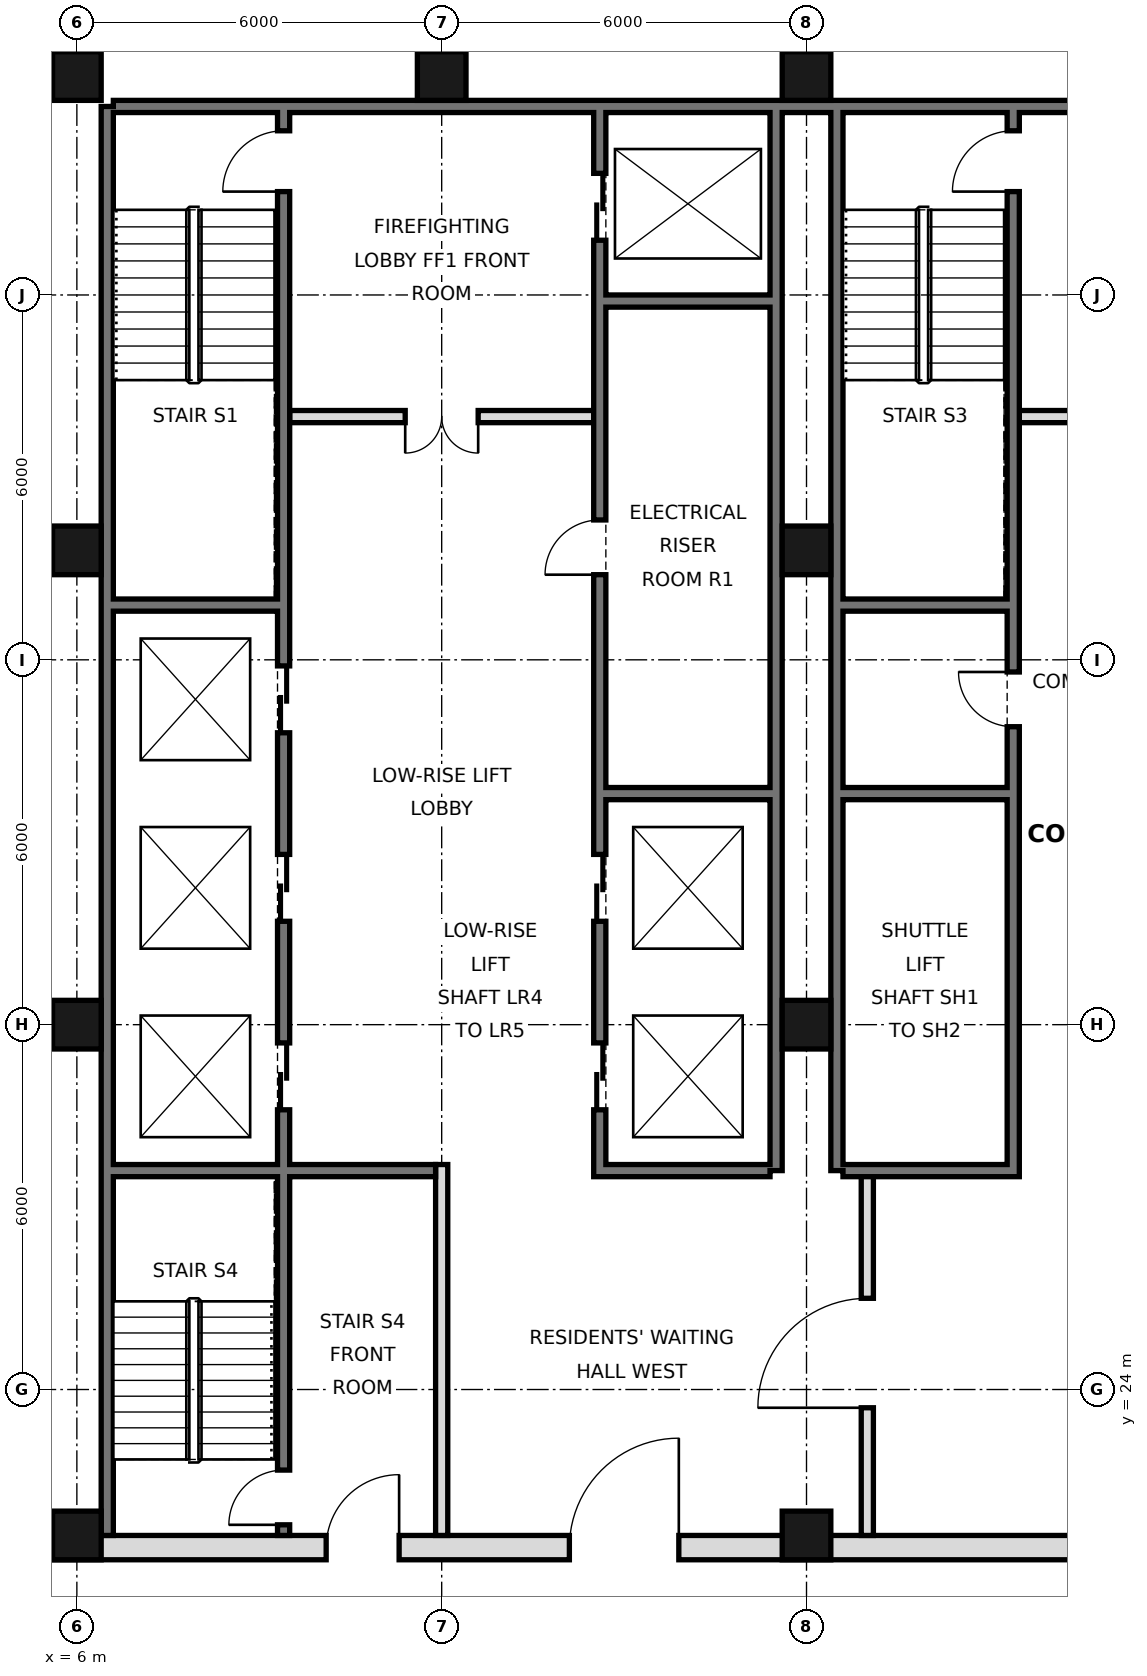
"""IFC4 building model, lengths in metres.
Left out: names, types, materials, properties, quantities, classifications, styles, units other than length and angle.
Written with IfcOpenShell. Run it as: python <this file> out.ifc"""

import sys

from ifc_helpers import new_model, si_unit, direction, frame, frame_2d, origin, origin_2d, place, context, subcontext, project, spatial, rectangle, hollow_rectangle, extrude, element, fill, save


model = new_model("IFC4")
c1 = context("Model", 3, precision=1e-05, world=origin(), true_north=direction((0.0, 1.0)))
c2 = subcontext(c1, "Body", "Model", "MODEL_VIEW")
j1 = project(units=[si_unit("LENGTHUNIT", "METRE"), si_unit("PLANEANGLEUNIT", "RADIAN")], contexts=[c1])
p1 = place(None, origin())
s1 = spatial("IfcSite", under=j1, at=p1, CompositionType="ELEMENT")
p2 = place(p1, origin())
s2 = spatial("IfcBuilding", under=s1, at=p2, CompositionType="ELEMENT")
p3 = place(p2, frame((0.0, 0.0, 103.4)))
s3 = spatial("IfcBuildingStorey", under=s2, at=p3, CompositionType="ELEMENT", Elevation=103.4)
for number, where, z_axis, x_axis in (
    (1, (6.0, 21.6, 0.0), (0.0, 0.0, 1.0), (1.0, 0.0, 0.0)),
    (2, (6.0, 30.0, 0.0), (0.0, 0.0, 1.0), (1.0, 0.0, 0.0)),
    (3, (6.0, 37.8, 0.0), (0.0, 0.0, 1.0), (1.0, 0.0, 0.0)),
    (4, (6.0, 45.6, 0.0), (0.0, 0.0, 1.0), (1.0, 0.0, 0.0)),
    (5, (12.0, 45.6, 0.0), (0.0, 0.0, 1.0), (1.0, 0.0, 0.0)),
    (6, (18.0, 21.6, 0.0), (0.0, 0.0, 1.0), (1.0, 0.0, 0.0)),
    (7, (18.0, 30.0, 0.0), (0.0, 0.0, 1.0), (1.0, 0.0, 0.0)),
    (8, (18.0, 37.8, 0.0), (0.0, 0.0, 1.0), (1.0, 0.0, 0.0)),
    (9, (18.0, 45.6, 0.0), (0.0, 0.0, 1.0), (1.0, 0.0, 0.0)),
):
    element("IfcColumn", number, at=place(p3, frame(where, z_axis=z_axis, x_axis=x_axis)), inside=s3, PredefinedType="COLUMN", context=c2, shape_type="SweptSolid", body=[
        extrude(hollow_rectangle(XDim=0.8, YDim=0.8, WallThickness=0.05, at=origin_2d()), origin(), (0.0, 0.0, 1.0), 3.6),
    ])
p4 = place(p3, frame((6.5, 21.6, 0.0), z_axis=(0.0, 0.0, 1.0), x_axis=(0.0, 1.0, 0.0)))
e10 = element("IfcWall", 10, at=p4, inside=s3, PredefinedType="SOLIDWALL", context=c2, shape_type="SweptSolid", body=[
    extrude(rectangle(XDim=23.5, YDim=0.2, at=frame_2d((11.75, 0.0))), origin(), (0.0, 0.0, 1.0), 3.42),
])
p5 = place(p3, frame((6.6, 45.1, 0.0), z_axis=(0.0, 0.0, 1.0), x_axis=(1.0, 0.0, 0.0)))
e11 = element("IfcWall", 11, at=p5, inside=s3, PredefinedType="SOLIDWALL", context=c2, shape_type="SweptSolid", body=[
    extrude(rectangle(XDim=34.8, YDim=0.2, at=frame_2d((17.4, 0.0))), origin(), (0.0, 0.0, 1.0), 3.42),
])
for number, where, z_axis, x_axis in (
    (12, (17.5, 27.6, 0.0), (0.0, 0.0, 1.0), (0.0, 1.0, 0.0)),
    (13, (18.5, 27.6, 0.0), (0.0, 0.0, 1.0), (0.0, 1.0, 0.0)),
):
    element("IfcWall", number, at=place(p3, frame(where, z_axis=z_axis, x_axis=x_axis)), inside=s3, PredefinedType="SOLIDWALL", context=c2, shape_type="SweptSolid", body=[
        extrude(rectangle(XDim=17.5, YDim=0.2, at=frame_2d((8.75, 0.0))), origin(), (0.0, 0.0, 1.0), 3.42),
    ])
p6 = place(p3, frame((5.6, 21.4, 0.0), z_axis=(0.0, 0.0, 1.0), x_axis=(1.0, 0.0, 0.0)))
e14 = element("IfcWall", 14, at=p6, inside=s3, PredefinedType="SOLIDWALL", context=c2, shape_type="SweptSolid", body=[
    extrude(rectangle(XDim=36.8, YDim=0.4, at=frame_2d((18.4, 0.0))), origin(), (0.0, 0.0, 1.0), 3.42),
])
p7 = place(p6, frame((8.5, 0.0, 0.0)))
e15 = element("IfcOpeningElement", 15, at=p7, cuts=e14, PredefinedType="OPENING", context=c2, shape_type="SweptSolid", body=[
    extrude(rectangle(XDim=1.8, YDim=2.1, at=frame_2d((0.9, 1.05))), frame((0.0, 0.21, 0.0), z_axis=(0.0, -1.0, 0.0), x_axis=(1.0, 0.0, 0.0)), (0.0, 0.0, 1.0), 0.42),
])
p8 = place(p6, frame((17.5, 0.0, 0.0)))
e16 = element("IfcOpeningElement", 16, at=p8, cuts=e14, PredefinedType="OPENING", context=c2, shape_type="SweptSolid", body=[
    extrude(rectangle(XDim=1.8, YDim=2.1, at=frame_2d((0.9, 1.05))), frame((0.0, 0.21, 0.0), z_axis=(0.0, -1.0, 0.0), x_axis=(1.0, 0.0, 0.0)), (0.0, 0.0, 1.0), 0.42),
])
p9 = place(p6, frame((26.5, 0.0, 0.0)))
e17 = element("IfcOpeningElement", 17, at=p9, cuts=e14, PredefinedType="OPENING", context=c2, shape_type="SweptSolid", body=[
    extrude(rectangle(XDim=1.8, YDim=2.1, at=frame_2d((0.9, 1.05))), frame((0.0, 0.21, 0.0), z_axis=(0.0, -1.0, 0.0), x_axis=(1.0, 0.0, 0.0)), (0.0, 0.0, 1.0), 0.42),
])
p10 = place(p6, frame((4.5, 0.0, 0.0)))
e18 = element("IfcOpeningElement", 18, at=p10, cuts=e14, PredefinedType="OPENING", context=c2, shape_type="SweptSolid", body=[
    extrude(rectangle(XDim=1.2, YDim=2.1, at=frame_2d((0.6, 1.05))), frame((0.0, 0.21, 0.0), z_axis=(0.0, -1.0, 0.0), x_axis=(1.0, 0.0, 0.0)), (0.0, 0.0, 1.0), 0.42),
])
p11 = place(p6, frame((31.1, 0.0, 0.0)))
e19 = element("IfcOpeningElement", 19, at=p11, cuts=e14, PredefinedType="OPENING", context=c2, shape_type="SweptSolid", body=[
    extrude(rectangle(XDim=1.2, YDim=2.1, at=frame_2d((0.6, 1.05))), frame((0.0, 0.21, 0.0), z_axis=(0.0, -1.0, 0.0), x_axis=(1.0, 0.0, 0.0)), (0.0, 0.0, 1.0), 0.42),
])
p12 = place(p3, frame((19.0, 21.6, 0.0), z_axis=(0.0, 0.0, 1.0), x_axis=(0.0, 1.0, 0.0)))
e20 = element("IfcWall", 20, at=p12, inside=s3, PredefinedType="PARTITIONING", context=c2, shape_type="SweptSolid", body=[
    extrude(rectangle(XDim=6.0, YDim=0.2, at=frame_2d((3.0, 0.0))), origin(), (0.0, 0.0, 1.0), 3.42),
])
p13 = place(p12, frame((2.1, 0.0, 0.0)))
e21 = element("IfcOpeningElement", 21, at=p13, cuts=e20, PredefinedType="OPENING", context=c2, shape_type="SweptSolid", body=[
    extrude(rectangle(XDim=1.8, YDim=2.1, at=frame_2d((0.9, 1.05))), frame((0.0, 0.11, 0.0), z_axis=(0.0, -1.0, 0.0), x_axis=(1.0, 0.0, 0.0)), (0.0, 0.0, 1.0), 0.22),
])
p14 = place(p3, frame((12.0, 21.6, 0.0), z_axis=(0.0, 0.0, 1.0), x_axis=(0.0, 1.0, 0.0)))
e22 = element("IfcWall", 22, at=p14, inside=s3, PredefinedType="PARTITIONING", context=c2, shape_type="SweptSolid", body=[
    extrude(rectangle(XDim=6.1, YDim=0.2, at=frame_2d((3.05, 0.0))), origin(), (0.0, 0.0, 1.0), 3.42),
])
p15 = place(p3, frame((14.6, 27.5, 0.0), z_axis=(0.0, 0.0, 1.0), x_axis=(0.0, 1.0, 0.0)))
e23 = element("IfcWall", 23, at=p15, inside=s3, PredefinedType="SOLIDWALL", context=c2, shape_type="SweptSolid", body=[
    extrude(rectangle(XDim=17.5, YDim=0.2, at=frame_2d((8.75, 0.0))), origin(), (0.0, 0.0, 1.0), 3.42),
])
p16 = place(p15, frame((1.1, 0.0, 0.0)))
e24 = element("IfcOpeningElement", 24, at=p16, cuts=e23, PredefinedType="OPENING", context=c2, shape_type="SweptSolid", body=[
    extrude(rectangle(XDim=1.1, YDim=2.1, at=frame_2d((0.55, 1.05))), frame((0.0, 0.11, 0.0), z_axis=(0.0, -1.0, 0.0), x_axis=(1.0, 0.0, 0.0)), (0.0, 0.0, 1.0), 0.22),
])
p17 = place(p15, frame((4.2, 0.0, 0.0)))
e25 = element("IfcOpeningElement", 25, at=p17, cuts=e23, PredefinedType="OPENING", context=c2, shape_type="SweptSolid", body=[
    extrude(rectangle(XDim=1.1, YDim=2.1, at=frame_2d((0.55, 1.05))), frame((0.0, 0.11, 0.0), z_axis=(0.0, -1.0, 0.0), x_axis=(1.0, 0.0, 0.0)), (0.0, 0.0, 1.0), 0.22),
])
p18 = place(p15, frame((15.4, 0.0, 0.0)))
e26 = element("IfcOpeningElement", 26, at=p18, cuts=e23, PredefinedType="OPENING", context=c2, shape_type="SweptSolid", body=[
    extrude(rectangle(XDim=1.1, YDim=2.1, at=frame_2d((0.55, 1.05))), frame((0.0, 0.11, 0.0), z_axis=(0.0, -1.0, 0.0), x_axis=(1.0, 0.0, 0.0)), (0.0, 0.0, 1.0), 0.22),
])
p19 = place(p15, frame((9.9, 0.0, 0.0)))
e27 = element("IfcOpeningElement", 27, at=p19, cuts=e23, PredefinedType="OPENING", context=c2, shape_type="SweptSolid", body=[
    extrude(rectangle(XDim=0.9, YDim=2.1, at=frame_2d((0.45, 1.05))), frame((0.0, 0.11, 0.0), z_axis=(0.0, -1.0, 0.0), x_axis=(1.0, 0.0, 0.0)), (0.0, 0.0, 1.0), 0.22),
])
p20 = place(p3, frame((21.4, 27.5, 0.0), z_axis=(0.0, 0.0, 1.0), x_axis=(0.0, 1.0, 0.0)))
e28 = element("IfcWall", 28, at=p20, inside=s3, PredefinedType="SOLIDWALL", context=c2, shape_type="SweptSolid", body=[
    extrude(rectangle(XDim=17.5, YDim=0.2, at=frame_2d((8.75, 0.0))), origin(), (0.0, 0.0, 1.0), 3.42),
])
p21 = place(p20, frame((16.2, 0.0, 0.0)))
e29 = element("IfcOpeningElement", 29, at=p21, cuts=e28, PredefinedType="OPENING", context=c2, shape_type="SweptSolid", body=[
    extrude(rectangle(XDim=1.0, YDim=2.1, at=frame_2d((0.5, 1.05))), frame((0.0, 0.11, 0.0), z_axis=(0.0, -1.0, 0.0), x_axis=(1.0, 0.0, 0.0)), (0.0, 0.0, 1.0), 0.22),
])
p22 = place(p20, frame((7.4, 0.0, 0.0)))
e30 = element("IfcOpeningElement", 30, at=p22, cuts=e28, PredefinedType="OPENING", context=c2, shape_type="SweptSolid", body=[
    extrude(rectangle(XDim=0.9, YDim=2.1, at=frame_2d((0.45, 1.05))), frame((0.0, 0.11, 0.0), z_axis=(0.0, -1.0, 0.0), x_axis=(1.0, 0.0, 0.0)), (0.0, 0.0, 1.0), 0.22),
])
p23 = place(p3, frame((9.4, 21.6, 0.0), z_axis=(0.0, 0.0, 1.0), x_axis=(0.0, 1.0, 0.0)))
e31 = element("IfcWall", 31, at=p23, inside=s3, PredefinedType="SOLIDWALL", context=c2, shape_type="SweptSolid", body=[
    extrude(rectangle(XDim=23.4, YDim=0.2, at=frame_2d((11.7, 0.0))), origin(), (0.0, 0.0, 1.0), 3.42),
])
p24 = place(p23, frame((7.0, 0.0, 0.0)))
e32 = element("IfcOpeningElement", 32, at=p24, cuts=e31, PredefinedType="OPENING", context=c2, shape_type="SweptSolid", body=[
    extrude(rectangle(XDim=1.1, YDim=2.1, at=frame_2d((0.55, 1.05))), frame((0.0, 0.11, 0.0), z_axis=(0.0, -1.0, 0.0), x_axis=(1.0, 0.0, 0.0)), (0.0, 0.0, 1.0), 0.22),
])
p25 = place(p23, frame((10.1, 0.0, 0.0)))
e33 = element("IfcOpeningElement", 33, at=p25, cuts=e31, PredefinedType="OPENING", context=c2, shape_type="SweptSolid", body=[
    extrude(rectangle(XDim=1.1, YDim=2.1, at=frame_2d((0.55, 1.05))), frame((0.0, 0.11, 0.0), z_axis=(0.0, -1.0, 0.0), x_axis=(1.0, 0.0, 0.0)), (0.0, 0.0, 1.0), 0.22),
])
p26 = place(p23, frame((13.2, 0.0, 0.0)))
e34 = element("IfcOpeningElement", 34, at=p26, cuts=e31, PredefinedType="OPENING", context=c2, shape_type="SweptSolid", body=[
    extrude(rectangle(XDim=1.1, YDim=2.1, at=frame_2d((0.55, 1.05))), frame((0.0, 0.11, 0.0), z_axis=(0.0, -1.0, 0.0), x_axis=(1.0, 0.0, 0.0)), (0.0, 0.0, 1.0), 0.22),
])
p27 = place(p23, frame((22.1, 0.0, 0.0)))
e35 = element("IfcOpeningElement", 35, at=p27, cuts=e31, PredefinedType="OPENING", context=c2, shape_type="SweptSolid", body=[
    extrude(rectangle(XDim=1.0, YDim=2.1, at=frame_2d((0.5, 1.05))), frame((0.0, 0.11, 0.0), z_axis=(0.0, -1.0, 0.0), x_axis=(1.0, 0.0, 0.0)), (0.0, 0.0, 1.0), 0.22),
])
p28 = place(p23, frame((0.175, 0.0, 0.0)))
e36 = element("IfcOpeningElement", 36, at=p28, cuts=e31, PredefinedType="OPENING", context=c2, shape_type="SweptSolid", body=[
    extrude(rectangle(XDim=0.9, YDim=2.1, at=frame_2d((0.45, 1.05))), frame((0.0, 0.11, 0.0), z_axis=(0.0, -1.0, 0.0), x_axis=(1.0, 0.0, 0.0)), (0.0, 0.0, 1.0), 0.22),
])
for number, where, z_axis, x_axis in (
    (37, (14.7, 27.6, 0.0), (0.0, 0.0, 1.0), (1.0, 0.0, 0.0)),
    (38, (18.6, 27.6, 0.0), (0.0, 0.0, 1.0), (1.0, 0.0, 0.0)),
):
    element("IfcWall", number, at=place(p3, frame(where, z_axis=z_axis, x_axis=x_axis)), inside=s3, PredefinedType="SOLIDWALL", context=c2, shape_type="SweptSolid", body=[
        extrude(rectangle(XDim=2.7, YDim=0.2, at=frame_2d((1.35, 0.0))), origin(), (0.0, 0.0, 1.0), 3.42),
    ])
p29 = place(p3, frame((6.6, 27.6, 0.0), z_axis=(0.0, 0.0, 1.0), x_axis=(1.0, 0.0, 0.0)))
e39 = element("IfcWall", 39, at=p29, inside=s3, PredefinedType="SOLIDWALL", context=c2, shape_type="SweptSolid", body=[
    extrude(rectangle(XDim=5.3, YDim=0.2, at=frame_2d((2.65, 0.0))), origin(), (0.0, 0.0, 1.0), 3.42),
])
for number, where, z_axis, x_axis in (
    (40, (14.7, 33.8, 0.0), (0.0, 0.0, 1.0), (1.0, 0.0, 0.0)),
    (41, (18.6, 33.8, 0.0), (0.0, 0.0, 1.0), (1.0, 0.0, 0.0)),
    (42, (18.6, 36.9, 0.0), (0.0, 0.0, 1.0), (1.0, 0.0, 0.0)),
    (43, (6.6, 36.9, 0.0), (0.0, 0.0, 1.0), (1.0, 0.0, 0.0)),
):
    element("IfcWall", number, at=place(p3, frame(where, z_axis=z_axis, x_axis=x_axis)), inside=s3, PredefinedType="SOLIDWALL", context=c2, shape_type="SweptSolid", body=[
        extrude(rectangle(XDim=2.7, YDim=0.2, at=frame_2d((1.35, 0.0))), origin(), (0.0, 0.0, 1.0), 3.42),
    ])
p30 = place(p3, frame((21.5, 40.0, 0.0), z_axis=(0.0, 0.0, 1.0), x_axis=(1.0, 0.0, 0.0)))
e44 = element("IfcWall", 44, at=p30, inside=s3, PredefinedType="PARTITIONING", context=c2, shape_type="SweptSolid", body=[
    extrude(rectangle(XDim=5.0, YDim=0.2, at=frame_2d((2.5, 0.0))), origin(), (0.0, 0.0, 1.0), 3.42),
])
p31 = place(p30, frame((1.9, 0.0, 0.0)))
e45 = element("IfcOpeningElement", 45, at=p31, cuts=e44, PredefinedType="OPENING", context=c2, shape_type="SweptSolid", body=[
    extrude(rectangle(XDim=1.2, YDim=2.1, at=frame_2d((0.6, 1.05))), frame((0.0, 0.11, 0.0), z_axis=(0.0, -1.0, 0.0), x_axis=(1.0, 0.0, 0.0)), (0.0, 0.0, 1.0), 0.22),
])
p32 = place(p3, frame((9.5, 40.0, 0.0), z_axis=(0.0, 0.0, 1.0), x_axis=(1.0, 0.0, 0.0)))
e46 = element("IfcWall", 46, at=p32, inside=s3, PredefinedType="PARTITIONING", context=c2, shape_type="SweptSolid", body=[
    extrude(rectangle(XDim=5.0, YDim=0.2, at=frame_2d((2.5, 0.0))), origin(), (0.0, 0.0, 1.0), 3.42),
])
p33 = place(p32, frame((1.9, 0.0, 0.0)))
e47 = element("IfcOpeningElement", 47, at=p33, cuts=e46, PredefinedType="OPENING", context=c2, shape_type="SweptSolid", body=[
    extrude(rectangle(XDim=1.2, YDim=2.1, at=frame_2d((0.6, 1.05))), frame((0.0, 0.11, 0.0), z_axis=(0.0, -1.0, 0.0), x_axis=(1.0, 0.0, 0.0)), (0.0, 0.0, 1.0), 0.22),
])
p34 = place(p3, frame((14.7, 41.9, 0.0), z_axis=(0.0, 0.0, 1.0), x_axis=(1.0, 0.0, 0.0)))
e48 = element("IfcWall", 48, at=p34, inside=s3, PredefinedType="SOLIDWALL", context=c2, shape_type="SweptSolid", body=[
    extrude(rectangle(XDim=2.7, YDim=0.2, at=frame_2d((1.35, 0.0))), origin(), (0.0, 0.0, 1.0), 3.42),
])
p35 = place(p7, frame((1.8, 0.0, 0.0), z_axis=(0.0, 0.0, 1.0), x_axis=(-1.0, 0.0, 0.0)))
e49 = element("IfcDoor", 49, at=p35, inside=s3, OperationType="SINGLE_SWING_LEFT", PredefinedType="DOOR", context=c2, shape_type="SweptSolid", body=[
    extrude(rectangle(XDim=1.8, YDim=2.1, at=frame_2d((0.9, 1.05))), frame((0.0, 0.025, 0.0), z_axis=(0.0, -1.0, 0.0), x_axis=(1.0, 0.0, 0.0)), (0.0, 0.0, 1.0), 0.05),
])
fill(e15, e49)
p36 = place(p13, origin())
e50 = element("IfcDoor", 50, at=p36, inside=s3, OperationType="SINGLE_SWING_LEFT", PredefinedType="DOOR", context=c2, shape_type="SweptSolid", body=[
    extrude(rectangle(XDim=1.8, YDim=2.1, at=frame_2d((0.9, 1.05))), frame((0.0, 0.025, 0.0), z_axis=(0.0, -1.0, 0.0), x_axis=(1.0, 0.0, 0.0)), (0.0, 0.0, 1.0), 0.05),
])
fill(e21, e50)
p37 = place(p10, frame((1.2, 0.0, 0.0), z_axis=(0.0, 0.0, 1.0), x_axis=(-1.0, 0.0, 0.0)))
e51 = element("IfcDoor", 51, at=p37, inside=s3, OperationType="SINGLE_SWING_LEFT", PredefinedType="DOOR", context=c2, shape_type="SweptSolid", body=[
    extrude(rectangle(XDim=1.2, YDim=2.1, at=frame_2d((0.6, 1.05))), frame((0.0, 0.025, 0.0), z_axis=(0.0, -1.0, 0.0), x_axis=(1.0, 0.0, 0.0)), (0.0, 0.0, 1.0), 0.05),
])
fill(e18, e51)
p38 = place(p33, frame((1.2, 0.0, 0.0), z_axis=(0.0, 0.0, 1.0), x_axis=(-1.0, 0.0, 0.0)))
e52 = element("IfcDoor", 52, at=p38, inside=s3, OperationType="DOUBLE_DOOR_SINGLE_SWING", PredefinedType="DOOR", context=c2, shape_type="SweptSolid", body=[
    extrude(rectangle(XDim=1.2, YDim=2.1, at=frame_2d((0.6, 1.05))), frame((0.0, 0.025, 0.0), z_axis=(0.0, -1.0, 0.0), x_axis=(1.0, 0.0, 0.0)), (0.0, 0.0, 1.0), 0.05),
])
fill(e47, e52)
p39 = place(p16, origin())
e53 = element("IfcDoor", 53, at=p39, inside=s3, OperationType="DOUBLE_DOOR_SLIDING", PredefinedType="DOOR", context=c2, shape_type="SweptSolid", body=[
    extrude(rectangle(XDim=1.1, YDim=2.1, at=frame_2d((0.55, 1.05))), frame((0.0, 0.025, 0.0), z_axis=(0.0, -1.0, 0.0), x_axis=(1.0, 0.0, 0.0)), (0.0, 0.0, 1.0), 0.05),
])
fill(e24, e53)
p40 = place(p17, origin())
e54 = element("IfcDoor", 54, at=p40, inside=s3, OperationType="DOUBLE_DOOR_SLIDING", PredefinedType="DOOR", context=c2, shape_type="SweptSolid", body=[
    extrude(rectangle(XDim=1.1, YDim=2.1, at=frame_2d((0.55, 1.05))), frame((0.0, 0.025, 0.0), z_axis=(0.0, -1.0, 0.0), x_axis=(1.0, 0.0, 0.0)), (0.0, 0.0, 1.0), 0.05),
])
fill(e25, e54)
p41 = place(p18, origin())
e55 = element("IfcDoor", 55, at=p41, inside=s3, OperationType="DOUBLE_DOOR_SLIDING", PredefinedType="DOOR", context=c2, shape_type="SweptSolid", body=[
    extrude(rectangle(XDim=1.1, YDim=2.1, at=frame_2d((0.55, 1.05))), frame((0.0, 0.025, 0.0), z_axis=(0.0, -1.0, 0.0), x_axis=(1.0, 0.0, 0.0)), (0.0, 0.0, 1.0), 0.05),
])
fill(e26, e55)
p42 = place(p24, origin())
e56 = element("IfcDoor", 56, at=p42, inside=s3, OperationType="DOUBLE_DOOR_SLIDING", PredefinedType="DOOR", context=c2, shape_type="SweptSolid", body=[
    extrude(rectangle(XDim=1.1, YDim=2.1, at=frame_2d((0.55, 1.05))), frame((0.0, 0.025, 0.0), z_axis=(0.0, -1.0, 0.0), x_axis=(1.0, 0.0, 0.0)), (0.0, 0.0, 1.0), 0.05),
])
fill(e32, e56)
p43 = place(p25, origin())
e57 = element("IfcDoor", 57, at=p43, inside=s3, OperationType="DOUBLE_DOOR_SLIDING", PredefinedType="DOOR", context=c2, shape_type="SweptSolid", body=[
    extrude(rectangle(XDim=1.1, YDim=2.1, at=frame_2d((0.55, 1.05))), frame((0.0, 0.025, 0.0), z_axis=(0.0, -1.0, 0.0), x_axis=(1.0, 0.0, 0.0)), (0.0, 0.0, 1.0), 0.05),
])
fill(e33, e57)
p44 = place(p26, origin())
e58 = element("IfcDoor", 58, at=p44, inside=s3, OperationType="DOUBLE_DOOR_SLIDING", PredefinedType="DOOR", context=c2, shape_type="SweptSolid", body=[
    extrude(rectangle(XDim=1.1, YDim=2.1, at=frame_2d((0.55, 1.05))), frame((0.0, 0.025, 0.0), z_axis=(0.0, -1.0, 0.0), x_axis=(1.0, 0.0, 0.0)), (0.0, 0.0, 1.0), 0.05),
])
fill(e34, e58)
p45 = place(p27, origin())
e59 = element("IfcDoor", 59, at=p45, inside=s3, OperationType="SINGLE_SWING_LEFT", PredefinedType="DOOR", context=c2, shape_type="SweptSolid", body=[
    extrude(rectangle(XDim=1.0, YDim=2.1, at=frame_2d((0.5, 1.05))), frame((0.0, 0.025, 0.0), z_axis=(0.0, -1.0, 0.0), x_axis=(1.0, 0.0, 0.0)), (0.0, 0.0, 1.0), 0.05),
])
fill(e35, e59)
p46 = place(p21, origin())
e60 = element("IfcDoor", 60, at=p46, inside=s3, OperationType="SINGLE_SWING_LEFT", PredefinedType="DOOR", context=c2, shape_type="SweptSolid", body=[
    extrude(rectangle(XDim=1.0, YDim=2.1, at=frame_2d((0.5, 1.05))), frame((0.0, 0.025, 0.0), z_axis=(0.0, -1.0, 0.0), x_axis=(1.0, 0.0, 0.0)), (0.0, 0.0, 1.0), 0.05),
])
fill(e29, e60)
p47 = place(p28, origin())
e61 = element("IfcDoor", 61, at=p47, inside=s3, OperationType="SINGLE_SWING_LEFT", PredefinedType="DOOR", context=c2, shape_type="SweptSolid", body=[
    extrude(rectangle(XDim=0.9, YDim=2.1, at=frame_2d((0.45, 1.05))), frame((0.0, 0.025, 0.0), z_axis=(0.0, -1.0, 0.0), x_axis=(1.0, 0.0, 0.0)), (0.0, 0.0, 1.0), 0.05),
])
fill(e36, e61)
p48 = place(p19, origin())
e62 = element("IfcDoor", 62, at=p48, inside=s3, OperationType="SINGLE_SWING_LEFT", PredefinedType="DOOR", context=c2, shape_type="SweptSolid", body=[
    extrude(rectangle(XDim=0.9, YDim=2.1, at=frame_2d((0.45, 1.05))), frame((0.0, 0.025, 0.0), z_axis=(0.0, -1.0, 0.0), x_axis=(1.0, 0.0, 0.0)), (0.0, 0.0, 1.0), 0.05),
])
fill(e27, e62)
p49 = place(p22, frame((0.9, 0.0, 0.0), z_axis=(0.0, 0.0, 1.0), x_axis=(-1.0, 0.0, 0.0)))
e63 = element("IfcDoor", 63, at=p49, inside=s3, OperationType="SINGLE_SWING_LEFT", PredefinedType="DOOR", context=c2, shape_type="SweptSolid", body=[
    extrude(rectangle(XDim=0.9, YDim=2.1, at=frame_2d((0.45, 1.05))), frame((0.0, 0.025, 0.0), z_axis=(0.0, -1.0, 0.0), x_axis=(1.0, 0.0, 0.0)), (0.0, 0.0, 1.0), 0.05),
])
fill(e30, e63)
save(model, sys.argv[1])
